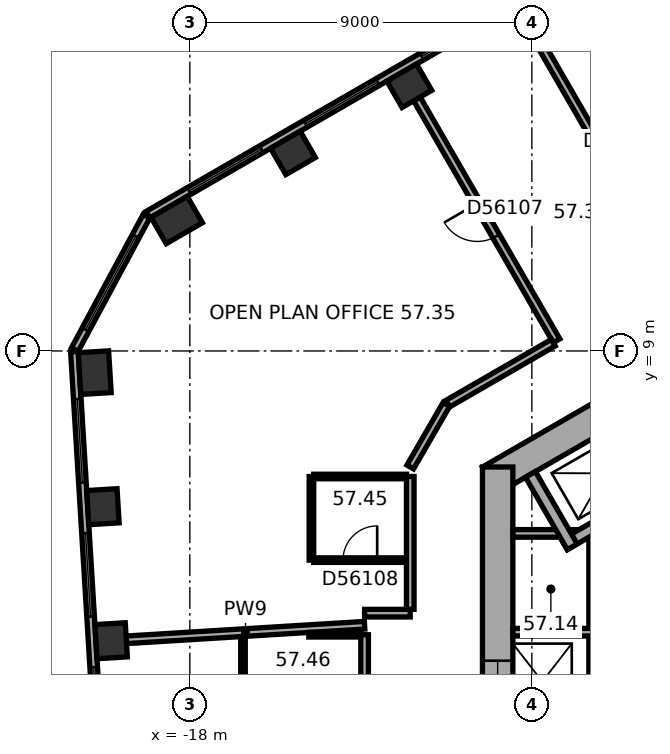
"""IFC4 building model, lengths in metres.
Left out: names, types, materials, properties, quantities, classifications, styles, units other than length and angle.
Written with IfcOpenShell. Run it as: python <this file> out.ifc"""

import sys

from ifc_helpers import new_model, si_unit, direction, frame, frame_2d, origin, origin_2d, place, context, subcontext, project, spatial, rectangle, extrude, element, fill, save


model = new_model("IFC4")
c1 = context("Model", 3, precision=1e-05, world=origin(), true_north=direction((0.0, 1.0)))
c2 = subcontext(c1, "Body", "Model", "MODEL_VIEW")
j1 = project(units=[si_unit("LENGTHUNIT", "METRE"), si_unit("PLANEANGLEUNIT", "RADIAN")], contexts=[c1])
p1 = place(None, origin())
s1 = spatial("IfcSite", under=j1, at=p1, CompositionType="ELEMENT")
p2 = place(p1, origin())
s2 = spatial("IfcBuilding", under=s1, at=p2, CompositionType="ELEMENT")
p3 = place(p2, frame((0.0, 0.0, 232.8)))
s3 = spatial("IfcBuildingStorey", under=s2, at=p3, CompositionType="ELEMENT", Elevation=232.8)
for number, where, z_axis, x_axis in (
    (1, (-12.225, 15.978, 0.0), (0.0, 0.0, 1.0), (-0.866, -0.5, 0.0)),
    (2, (-15.285, 14.211, 0.0), (0.0, 0.0, 1.0), (-0.866, -0.5, 0.0)),
):
    element("IfcColumn", number, at=place(p3, frame(where, z_axis=z_axis, x_axis=x_axis)), inside=s3, PredefinedType="COLUMN", context=c2, shape_type="SweptSolid", body=[
        extrude(rectangle(XDim=0.9, YDim=0.8, at=origin_2d()), origin(), (0.0, 0.0, 1.0), 3.7),
    ])
for number, where, z_axis, x_axis in (
    (3, (-18.345, 12.445, 0.0), (0.0, 0.0, 1.0), (-0.866, -0.5, 0.0)),
    (4, (-20.503, 8.429, 0.0), (0.0, 0.0, 1.0), (0.061, -0.998, 0.0)),
):
    element("IfcColumn", number, at=place(p3, frame(where, z_axis=z_axis, x_axis=x_axis)), inside=s3, PredefinedType="COLUMN", context=c2, shape_type="SweptSolid", body=[
        extrude(rectangle(XDim=1.1, YDim=0.8, at=origin_2d()), origin(), (0.0, 0.0, 1.0), 3.7),
    ])
for number, where, z_axis, x_axis in (
    (5, (-20.287, 4.902, 0.0), (0.0, 0.0, 1.0), (0.061, -0.998, 0.0)),
    (6, (-20.071, 1.375, 0.0), (0.0, 0.0, 1.0), (0.061, -0.998, 0.0)),
):
    element("IfcColumn", number, at=place(p3, frame(where, z_axis=z_axis, x_axis=x_axis)), inside=s3, PredefinedType="COLUMN", context=c2, shape_type="SweptSolid", body=[
        extrude(rectangle(XDim=0.9, YDim=0.8, at=origin_2d()), origin(), (0.0, 0.0, 1.0), 3.7),
    ])
p4 = place(p3, frame((0.2, 11.547, 0.0), z_axis=(0.0, 0.0, 1.0), x_axis=(-0.866023897231, -0.500002609418, 0.0)))
e7 = element("IfcWall", 7, at=p4, inside=s3, PredefinedType="SHEAR", context=c2, shape_type="SweptSolid", body=[
    extrude(rectangle(XDim=11.894, YDim=0.8, at=frame_2d((5.947, 0.0))), origin(), (0.0, 0.0, 1.0), 3.7),
])
p5 = place(p4, frame((6.147, 0.0, 0.0)))
e8 = element("IfcOpeningElement", 8, at=p5, cuts=e7, PredefinedType="OPENING", context=c2, shape_type="SweptSolid", body=[
    extrude(rectangle(XDim=1.5, YDim=2.1, at=frame_2d((0.75, 1.05))), frame((0.0, 0.41, 0.0), z_axis=(0.0, -1.0, 0.0), x_axis=(1.0, 0.0, 0.0)), (0.0, 0.0, 1.0), 0.82),
])
p6 = place(p4, frame((2.997, 0.0, 0.0)))
e9 = element("IfcOpeningElement", 9, at=p6, cuts=e7, PredefinedType="OPENING", context=c2, shape_type="SweptSolid", body=[
    extrude(rectangle(XDim=0.9, YDim=2.1, at=frame_2d((0.45, 1.05))), frame((0.0, 0.41, 0.0), z_axis=(0.0, -1.0, 0.0), x_axis=(1.0, 0.0, 0.0)), (0.0, 0.0, 1.0), 0.82),
])
p7 = place(p3, frame((-9.9, 5.947, 0.0), z_axis=(0.0, 0.0, 1.0), x_axis=(0.0, -1.0, 0.0)))
e10 = element("IfcWall", 10, at=p7, inside=s3, PredefinedType="SHEAR", context=c2, shape_type="SweptSolid", body=[
    extrude(rectangle(XDim=11.894, YDim=0.8, at=frame_2d((5.947, 0.0))), origin(), (0.0, 0.0, 1.0), 3.7),
])
p8 = place(p7, frame((5.097, 0.0, 0.0)))
e11 = element("IfcOpeningElement", 11, at=p8, cuts=e10, PredefinedType="OPENING", context=c2, shape_type="SweptSolid", body=[
    extrude(rectangle(XDim=1.1, YDim=2.1, at=frame_2d((0.55, 1.05))), frame((0.0, 0.41, 0.0), z_axis=(0.0, -1.0, 0.0), x_axis=(1.0, 0.0, 0.0)), (0.0, 0.0, 1.0), 0.82),
])
p9 = place(p7, frame((7.697, 0.0, 0.0)))
e12 = element("IfcOpeningElement", 12, at=p9, cuts=e10, PredefinedType="OPENING", context=c2, shape_type="SweptSolid", body=[
    extrude(rectangle(XDim=1.1, YDim=2.1, at=frame_2d((0.55, 1.05))), frame((0.0, 0.41, 0.0), z_axis=(0.0, -1.0, 0.0), x_axis=(1.0, 0.0, 0.0)), (0.0, 0.0, 1.0), 0.82),
])
p10 = place(p3, frame((-2.786, 22.005, 0.0), z_axis=(0.0, 0.0, 1.0), x_axis=(-0.866026555358, -0.49999800541, 0.0)))
e13 = element("IfcWall", 13, at=p10, inside=s3, PredefinedType="STANDARD", context=c2, shape_type="SweptSolid", body=[
    extrude(rectangle(XDim=18.841, YDim=0.2, at=frame_2d((9.421, 0.0))), origin(), (0.0, 0.0, 1.0), 3.7),
])
p11 = place(p10, frame((1.254, 0.0, 0.9)))
e14 = element("IfcOpeningElement", 14, at=p11, cuts=e13, PredefinedType="OPENING", context=c2, shape_type="SweptSolid", body=[
    extrude(rectangle(XDim=2.2, YDim=2.0, at=frame_2d((1.1, 1.0))), frame((0.0, 0.11, 0.0), z_axis=(0.0, -1.0, 0.0), x_axis=(1.0, 0.0, 0.0)), (0.0, 0.0, 1.0), 0.22),
])
p12 = place(p10, frame((4.788, 0.0, 0.9)))
e15 = element("IfcOpeningElement", 15, at=p12, cuts=e13, PredefinedType="OPENING", context=c2, shape_type="SweptSolid", body=[
    extrude(rectangle(XDim=2.2, YDim=2.0, at=frame_2d((1.1, 1.0))), frame((0.0, 0.11, 0.0), z_axis=(0.0, -1.0, 0.0), x_axis=(1.0, 0.0, 0.0)), (0.0, 0.0, 1.0), 0.22),
])
p13 = place(p10, frame((8.321, 0.0, 0.9)))
e16 = element("IfcOpeningElement", 16, at=p13, cuts=e13, PredefinedType="OPENING", context=c2, shape_type="SweptSolid", body=[
    extrude(rectangle(XDim=2.2, YDim=2.0, at=frame_2d((1.1, 1.0))), frame((0.0, 0.11, 0.0), z_axis=(0.0, -1.0, 0.0), x_axis=(1.0, 0.0, 0.0)), (0.0, 0.0, 1.0), 0.22),
])
p14 = place(p10, frame((11.855, 0.0, 0.9)))
e17 = element("IfcOpeningElement", 17, at=p14, cuts=e13, PredefinedType="OPENING", context=c2, shape_type="SweptSolid", body=[
    extrude(rectangle(XDim=2.2, YDim=2.0, at=frame_2d((1.1, 1.0))), frame((0.0, 0.11, 0.0), z_axis=(0.0, -1.0, 0.0), x_axis=(1.0, 0.0, 0.0)), (0.0, 0.0, 1.0), 0.22),
])
p15 = place(p10, frame((15.389, 0.0, 0.9)))
e18 = element("IfcOpeningElement", 18, at=p15, cuts=e13, PredefinedType="OPENING", context=c2, shape_type="SweptSolid", body=[
    extrude(rectangle(XDim=2.2, YDim=2.0, at=frame_2d((1.1, 1.0))), frame((0.0, 0.11, 0.0), z_axis=(0.0, -1.0, 0.0), x_axis=(1.0, 0.0, 0.0)), (0.0, 0.0, 1.0), 0.22),
])
p16 = place(p3, frame((-19.141, 12.545, 0.0), z_axis=(0.0, 0.0, 1.0), x_axis=(-0.473306370921, -0.880897882416, 0.0)))
e19 = element("IfcWall", 19, at=p16, inside=s3, PredefinedType="STANDARD", context=c2, shape_type="SweptSolid", body=[
    extrude(rectangle(XDim=3.983, YDim=0.2, at=frame_2d((1.991, 0.0))), origin(), (0.0, 0.0, 1.0), 3.7),
])
p17 = place(p16, frame((0.591, 0.0, 0.9)))
e20 = element("IfcOpeningElement", 20, at=p17, cuts=e19, PredefinedType="OPENING", context=c2, shape_type="SweptSolid", body=[
    extrude(rectangle(XDim=2.8, YDim=2.0, at=frame_2d((1.4, 1.0))), frame((0.0, 0.11, 0.0), z_axis=(0.0, -1.0, 0.0), x_axis=(1.0, 0.0, 0.0)), (0.0, 0.0, 1.0), 0.22),
])
p18 = place(p3, frame((-21.038, 8.984, 0.0), z_axis=(0.0, 0.0, 1.0), x_axis=(0.061043935634, -0.998135079998, 0.0)))
e21 = element("IfcWall", 21, at=p18, inside=s3, PredefinedType="STANDARD", context=c2, shape_type="SweptSolid", body=[
    extrude(rectangle(XDim=18.841, YDim=0.2, at=frame_2d((9.421, 0.0))), origin(), (0.0, 0.0, 1.0), 3.7),
])
p19 = place(p18, frame((1.253, 0.0, 0.9)))
e22 = element("IfcOpeningElement", 22, at=p19, cuts=e21, PredefinedType="OPENING", context=c2, shape_type="SweptSolid", body=[
    extrude(rectangle(XDim=2.2, YDim=2.0, at=frame_2d((1.1, 1.0))), frame((0.0, 0.11, 0.0), z_axis=(0.0, -1.0, 0.0), x_axis=(1.0, 0.0, 0.0)), (0.0, 0.0, 1.0), 0.22),
])
p20 = place(p18, frame((4.786, 0.0, 0.9)))
e23 = element("IfcOpeningElement", 23, at=p20, cuts=e21, PredefinedType="OPENING", context=c2, shape_type="SweptSolid", body=[
    extrude(rectangle(XDim=2.2, YDim=2.0, at=frame_2d((1.1, 1.0))), frame((0.0, 0.11, 0.0), z_axis=(0.0, -1.0, 0.0), x_axis=(1.0, 0.0, 0.0)), (0.0, 0.0, 1.0), 0.22),
])
p21 = place(p18, frame((8.32, 0.0, 0.9)))
e24 = element("IfcOpeningElement", 24, at=p21, cuts=e21, PredefinedType="OPENING", context=c2, shape_type="SweptSolid", body=[
    extrude(rectangle(XDim=2.2, YDim=2.0, at=frame_2d((1.1, 1.0))), frame((0.0, 0.11, 0.0), z_axis=(0.0, -1.0, 0.0), x_axis=(1.0, 0.0, 0.0)), (0.0, 0.0, 1.0), 0.22),
])
p22 = place(p18, frame((11.854, 0.0, 0.9)))
e25 = element("IfcOpeningElement", 25, at=p22, cuts=e21, PredefinedType="OPENING", context=c2, shape_type="SweptSolid", body=[
    extrude(rectangle(XDim=2.2, YDim=2.0, at=frame_2d((1.1, 1.0))), frame((0.0, 0.11, 0.0), z_axis=(0.0, -1.0, 0.0), x_axis=(1.0, 0.0, 0.0)), (0.0, 0.0, 1.0), 0.22),
])
p23 = place(p18, frame((15.387, 0.0, 0.9)))
e26 = element("IfcOpeningElement", 26, at=p23, cuts=e21, PredefinedType="OPENING", context=c2, shape_type="SweptSolid", body=[
    extrude(rectangle(XDim=2.2, YDim=2.0, at=frame_2d((1.1, 1.0))), frame((0.0, 0.11, 0.0), z_axis=(0.0, -1.0, 0.0), x_axis=(1.0, 0.0, 0.0)), (0.0, 0.0, 1.0), 0.22),
])
p24 = place(p3, frame((-7.4, 4.3, 0.0), z_axis=(0.0, 0.0, 1.0), x_axis=(0.0, -1.0, 0.0)))
e27 = element("IfcWall", 27, at=p24, inside=s3, PredefinedType="PARTITIONING", context=c2, shape_type="SweptSolid", body=[
    extrude(rectangle(XDim=8.0, YDim=0.2, at=frame_2d((4.0, 0.0))), origin(), (0.0, 0.0, 1.0), 3.42),
])
for number, where, z_axis, x_axis in (
    (28, (-7.3, 4.2, 0.0), (0.0, 0.0, 1.0), (-1.0, 0.0, 0.0)),
    (29, (-7.3, 1.6, 0.0), (0.0, 0.0, 1.0), (-1.0, 0.0, 0.0)),
):
    element("IfcWall", number, at=place(p3, frame(where, z_axis=z_axis, x_axis=x_axis)), inside=s3, PredefinedType="PARTITIONING", context=c2, shape_type="SweptSolid", body=[
        extrude(rectangle(XDim=2.2, YDim=0.2, at=frame_2d((1.1, 0.0))), origin(), (0.0, 0.0, 1.0), 3.42),
    ])
p25 = place(p3, frame((-5.24, 5.577, 0.0), z_axis=(0.0, 0.0, 1.0), x_axis=(-0.866014461049, -0.500018952895, 0.0)))
e30 = element("IfcWall", 30, at=p25, inside=s3, PredefinedType="SHEAR", context=c2, shape_type="SweptSolid", body=[
    extrude(rectangle(XDim=3.35, YDim=0.3, at=frame_2d((1.675, 0.0))), origin(), (0.0, 0.0, 1.0), 3.42),
])
p26 = place(p3, frame((-7.937, 3.847, 0.0), z_axis=(0.0, 0.0, 1.0), x_axis=(-0.50002983664, 0.866008176907, 0.0)))
e31 = element("IfcWall", 31, at=p26, inside=s3, PredefinedType="SHEAR", context=c2, shape_type="SweptSolid", body=[
    extrude(rectangle(XDim=2.2, YDim=0.3, at=frame_2d((1.1, 0.0))), origin(), (0.0, 0.0, 1.0), 3.42),
])
p27 = place(p3, frame((-19.672, 1.4, 0.0), z_axis=(0.0, 0.0, 1.0), x_axis=(0.99813499784, 0.061045278997, 0.0)))
e32 = element("IfcWall", 32, at=p27, inside=s3, PredefinedType="PARTITIONING", context=c2, shape_type="SweptSolid", body=[
    extrude(rectangle(XDim=6.283, YDim=0.2, at=frame_2d((3.142, 0.0))), origin(), (0.0, 0.0, 1.0), 2.87),
])
p28 = place(p3, frame((-16.601, -1.267, 0.0), z_axis=(0.0, 0.0, 1.0), x_axis=(0.0, 1.0, 0.0)))
e33 = element("IfcWall", 33, at=p28, inside=s3, PredefinedType="PARTITIONING", context=c2, shape_type="SweptSolid", body=[
    extrude(rectangle(XDim=2.75, YDim=0.12, at=frame_2d((1.375, 0.0))), origin(), (0.0, 0.0, 1.0), 3.42),
])
p29 = place(p3, frame((-14.869, 1.533, 0.0), z_axis=(0.0, 0.0, 1.0), x_axis=(1.0, 0.0, 0.0)))
e34 = element("IfcWall", 34, at=p29, inside=s3, PredefinedType="PARTITIONING", context=c2, shape_type="SweptSolid", body=[
    extrude(rectangle(XDim=1.368, YDim=0.12, at=frame_2d((0.684, 0.0))), origin(), (0.0, 0.0, 1.0), 3.42),
])
p30 = place(p3, frame((-14.8, 3.497, 0.0), z_axis=(0.0, 0.0, 1.0), x_axis=(0.0, 1.0, 0.0)))
e35 = element("IfcWall", 35, at=p30, inside=s3, PredefinedType="PARTITIONING", context=c2, shape_type="SweptSolid", body=[
    extrude(rectangle(XDim=2.2, YDim=0.12, at=frame_2d((1.1, 0.0))), origin(), (0.0, 0.0, 1.0), 3.42),
])
p31 = place(p3, frame((-14.74, 5.697, 0.0), z_axis=(0.0, 0.0, 1.0), x_axis=(1.0, 0.0, 0.0)))
e36 = element("IfcWall", 36, at=p31, inside=s3, PredefinedType="PARTITIONING", context=c2, shape_type="SweptSolid", body=[
    extrude(rectangle(XDim=2.44, YDim=0.12, at=frame_2d((1.22, 0.0))), origin(), (0.0, 0.0, 1.0), 3.42),
])
p32 = place(p3, frame((-13.401, 1.533, 0.0), z_axis=(0.0, 0.0, 1.0), x_axis=(0.0, -1.0, 0.0)))
e37 = element("IfcWall", 37, at=p32, inside=s3, PredefinedType="PARTITIONING", context=c2, shape_type="SweptSolid", body=[
    extrude(rectangle(XDim=5.534, YDim=0.2, at=frame_2d((2.767, 0.0))), origin(), (0.0, 0.0, 1.0), 3.42),
])
p33 = place(p32, frame((3.692, 0.0, 0.0)))
e38 = element("IfcOpeningElement", 38, at=p33, cuts=e37, PredefinedType="OPENING", context=c2, shape_type="SweptSolid", body=[
    extrude(rectangle(XDim=1.0, YDim=2.1, at=frame_2d((0.5, 1.05))), frame((0.0, 0.11, 0.0), z_axis=(0.0, -1.0, 0.0), x_axis=(1.0, 0.0, 0.0)), (0.0, 0.0, 1.0), 0.22),
])
p34 = place(p3, frame((-12.3, 3.497, 0.0), z_axis=(0.0, 0.0, 1.0), x_axis=(-1.0, 0.0, 0.0)))
e39 = element("IfcWall", 39, at=p34, inside=s3, PredefinedType="PARTITIONING", context=c2, shape_type="SweptSolid", body=[
    extrude(rectangle(XDim=2.44, YDim=0.12, at=frame_2d((1.22, 0.0))), origin(), (0.0, 0.0, 1.0), 3.42),
])
p35 = place(p34, frame((0.77, 0.0, 0.0)))
e40 = element("IfcOpeningElement", 40, at=p35, cuts=e39, PredefinedType="OPENING", context=c2, shape_type="SweptSolid", body=[
    extrude(rectangle(XDim=0.9, YDim=2.1, at=frame_2d((0.45, 1.05))), frame((0.0, 0.07, 0.0), z_axis=(0.0, -1.0, 0.0), x_axis=(1.0, 0.0, 0.0)), (0.0, 0.0, 1.0), 0.14),
])
p36 = place(p3, frame((-12.2, 2.101, 0.0), z_axis=(0.0, 0.0, 1.0), x_axis=(-1.0, 0.0, 0.0)))
e41 = element("IfcWall", 41, at=p36, inside=s3, PredefinedType="PARTITIONING", context=c2, shape_type="SweptSolid", body=[
    extrude(rectangle(XDim=1.201, YDim=0.2, at=frame_2d((0.601, 0.0))), origin(), (0.0, 0.0, 1.0), 3.42),
])
p37 = place(p3, frame((-12.2, 5.697, 0.0), z_axis=(0.0, 0.0, 1.0), x_axis=(0.0, -1.0, 0.0)))
e42 = element("IfcWall", 42, at=p37, inside=s3, PredefinedType="PARTITIONING", context=c2, shape_type="SweptSolid", body=[
    extrude(rectangle(XDim=3.496, YDim=0.2, at=frame_2d((1.748, 0.0))), origin(), (0.0, 0.0, 1.0), 3.42),
])
p38 = place(p3, frame((-12.025, 15.632, 0.0), z_axis=(0.0, 0.0, 1.0), x_axis=(0.499983153418, -0.866035129944, 0.0)))
e43 = element("IfcWall", 43, at=p38, inside=s3, PredefinedType="PARTITIONING", context=c2, shape_type="SweptSolid", body=[
    extrude(rectangle(XDim=7.35, YDim=0.2, at=frame_2d((3.675, 0.0))), origin(), (0.0, 0.0, 1.0), 3.42),
])
p39 = place(p38, frame((3.175, 0.0, 0.0)))
e44 = element("IfcOpeningElement", 44, at=p39, cuts=e43, PredefinedType="OPENING", context=c2, shape_type="SweptSolid", body=[
    extrude(rectangle(XDim=1.0, YDim=2.1, at=frame_2d((0.5, 1.05))), frame((0.0, 0.11, 0.0), z_axis=(0.0, -1.0, 0.0), x_axis=(1.0, 0.0, 0.0)), (0.0, 0.0, 1.0), 0.22),
])
p40 = place(p3, frame((-11.25, 7.592, 0.0), z_axis=(0.0, 0.0, 1.0), x_axis=(-0.500022797313, -0.86601224135, 0.0)))
e45 = element("IfcWall", 45, at=p40, inside=s3, PredefinedType="PARTITIONING", context=c2, shape_type="SweptSolid", body=[
    extrude(rectangle(XDim=1.9, YDim=0.2, at=frame_2d((0.95, 0.0))), origin(), (0.0, 0.0, 1.0), 3.42),
])
p41 = place(p3, frame((-8.965, 17.399, 0.0), z_axis=(0.0, 0.0, 1.0), x_axis=(0.499993683172, -0.866029050776, 0.0)))
e46 = element("IfcWall", 46, at=p41, inside=s3, PredefinedType="PARTITIONING", context=c2, shape_type="SweptSolid", body=[
    extrude(rectangle(XDim=7.35, YDim=0.2, at=frame_2d((3.675, 0.0))), origin(), (0.0, 0.0, 1.0), 2.87),
])
p42 = place(p41, frame((3.175, 0.0, 0.0)))
e47 = element("IfcOpeningElement", 47, at=p42, cuts=e46, PredefinedType="OPENING", context=c2, shape_type="SweptSolid", body=[
    extrude(rectangle(XDim=1.0, YDim=2.1, at=frame_2d((0.5, 1.05))), frame((0.0, 0.11, 0.0), z_axis=(0.0, -1.0, 0.0), x_axis=(1.0, 0.0, 0.0)), (0.0, 0.0, 1.0), 0.22),
])
p43 = place(p3, frame((-8.437, 9.217, 0.0), z_axis=(0.0, 0.0, 1.0), x_axis=(-0.866005660673, -0.500034194513, 0.0)))
e48 = element("IfcWall", 48, at=p43, inside=s3, PredefinedType="PARTITIONING", context=c2, shape_type="SweptSolid", body=[
    extrude(rectangle(XDim=3.209, YDim=0.2, at=frame_2d((1.604, 0.0))), origin(), (0.0, 0.0, 1.0), 3.42),
])
p44 = place(p13, origin())
e49 = element("IfcWindow", 49, at=p44, inside=s3, PartitioningType="SINGLE_PANEL", PredefinedType="WINDOW", context=c2, shape_type="SweptSolid", body=[
    extrude(rectangle(XDim=2.2, YDim=2.0, at=frame_2d((1.1, 1.0))), frame((0.0, 0.03, 0.0), z_axis=(0.0, -1.0, 0.0), x_axis=(1.0, 0.0, 0.0)), (0.0, 0.0, 1.0), 0.06),
])
fill(e16, e49)
p45 = place(p14, origin())
e50 = element("IfcWindow", 50, at=p45, inside=s3, PartitioningType="SINGLE_PANEL", PredefinedType="WINDOW", context=c2, shape_type="SweptSolid", body=[
    extrude(rectangle(XDim=2.2, YDim=2.0, at=frame_2d((1.1, 1.0))), frame((0.0, 0.03, 0.0), z_axis=(0.0, -1.0, 0.0), x_axis=(1.0, 0.0, 0.0)), (0.0, 0.0, 1.0), 0.06),
])
fill(e17, e50)
p46 = place(p15, origin())
e51 = element("IfcWindow", 51, at=p46, inside=s3, PartitioningType="SINGLE_PANEL", PredefinedType="WINDOW", context=c2, shape_type="SweptSolid", body=[
    extrude(rectangle(XDim=2.2, YDim=2.0, at=frame_2d((1.1, 1.0))), frame((0.0, 0.03, 0.0), z_axis=(0.0, -1.0, 0.0), x_axis=(1.0, 0.0, 0.0)), (0.0, 0.0, 1.0), 0.06),
])
fill(e18, e51)
p47 = place(p17, origin())
e52 = element("IfcWindow", 52, at=p47, inside=s3, PartitioningType="SINGLE_PANEL", PredefinedType="WINDOW", context=c2, shape_type="SweptSolid", body=[
    extrude(rectangle(XDim=2.8, YDim=2.0, at=frame_2d((1.4, 1.0))), frame((0.0, 0.03, 0.0), z_axis=(0.0, -1.0, 0.0), x_axis=(1.0, 0.0, 0.0)), (0.0, 0.0, 1.0), 0.06),
])
fill(e20, e52)
p48 = place(p19, origin())
e53 = element("IfcWindow", 53, at=p48, inside=s3, PartitioningType="SINGLE_PANEL", PredefinedType="WINDOW", context=c2, shape_type="SweptSolid", body=[
    extrude(rectangle(XDim=2.2, YDim=2.0, at=frame_2d((1.1, 1.0))), frame((0.0, 0.03, 0.0), z_axis=(0.0, -1.0, 0.0), x_axis=(1.0, 0.0, 0.0)), (0.0, 0.0, 1.0), 0.06),
])
fill(e22, e53)
p49 = place(p20, origin())
e54 = element("IfcWindow", 54, at=p49, inside=s3, PartitioningType="SINGLE_PANEL", PredefinedType="WINDOW", context=c2, shape_type="SweptSolid", body=[
    extrude(rectangle(XDim=2.2, YDim=2.0, at=frame_2d((1.1, 1.0))), frame((0.0, 0.03, 0.0), z_axis=(0.0, -1.0, 0.0), x_axis=(1.0, 0.0, 0.0)), (0.0, 0.0, 1.0), 0.06),
])
fill(e23, e54)
p50 = place(p21, origin())
e55 = element("IfcWindow", 55, at=p50, inside=s3, PartitioningType="SINGLE_PANEL", PredefinedType="WINDOW", context=c2, shape_type="SweptSolid", body=[
    extrude(rectangle(XDim=2.2, YDim=2.0, at=frame_2d((1.1, 1.0))), frame((0.0, 0.03, 0.0), z_axis=(0.0, -1.0, 0.0), x_axis=(1.0, 0.0, 0.0)), (0.0, 0.0, 1.0), 0.06),
])
fill(e24, e55)
p51 = place(p8, origin())
e56 = element("IfcDoor", 56, at=p51, inside=s3, OperationType="DOUBLE_DOOR_SLIDING", PredefinedType="DOOR", context=c2, shape_type="SweptSolid", body=[
    extrude(rectangle(XDim=1.1, YDim=2.1, at=frame_2d((0.55, 1.05))), frame((0.0, 0.025, 0.0), z_axis=(0.0, -1.0, 0.0), x_axis=(1.0, 0.0, 0.0)), (0.0, 0.0, 1.0), 0.05),
])
fill(e11, e56)
p52 = place(p39, origin())
e57 = element("IfcDoor", 57, at=p52, inside=s3, OperationType="SINGLE_SWING_LEFT", PredefinedType="DOOR", context=c2, shape_type="SweptSolid", body=[
    extrude(rectangle(XDim=1.0, YDim=2.1, at=frame_2d((0.5, 1.05))), frame((0.0, 0.025, 0.0), z_axis=(0.0, -1.0, 0.0), x_axis=(1.0, 0.0, 0.0)), (0.0, 0.0, 1.0), 0.05),
])
fill(e44, e57)
p53 = place(p35, origin())
e58 = element("IfcDoor", 58, at=p53, inside=s3, OperationType="SINGLE_SWING_LEFT", PredefinedType="DOOR", context=c2, shape_type="SweptSolid", body=[
    extrude(rectangle(XDim=0.9, YDim=2.1, at=frame_2d((0.45, 1.05))), frame((0.0, 0.025, 0.0), z_axis=(0.0, -1.0, 0.0), x_axis=(1.0, 0.0, 0.0)), (0.0, 0.0, 1.0), 0.05),
])
fill(e40, e58)
save(model, sys.argv[1])
